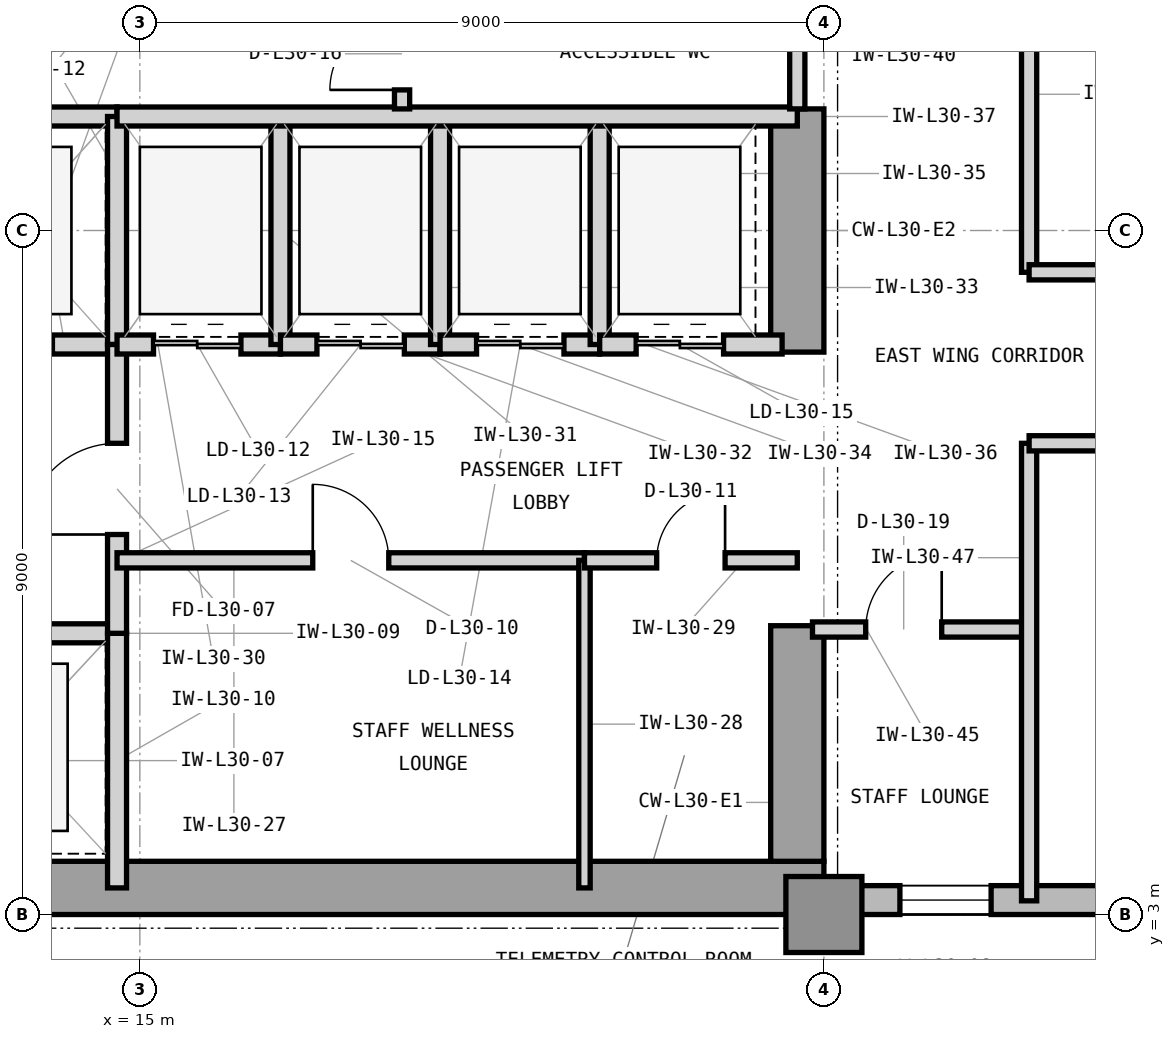
"""IFC4 building model, lengths in metres.
Left out: names, types, materials, properties, quantities, classifications, styles, units other than length and angle.
Written with IfcOpenShell. Run it as: python <this file> out.ifc"""

import sys

from ifc_helpers import new_model, si_unit, direction, frame, frame_2d, origin, origin_2d, place, context, subcontext, project, spatial, rectangle, extrude, element, fill, save


model = new_model("IFC4")
c1 = context("Model", 3, precision=1e-05, world=origin(), true_north=direction((0.0, 1.0)))
c2 = subcontext(c1, "Body", "Model", "MODEL_VIEW")
j1 = project(units=[si_unit("LENGTHUNIT", "METRE"), si_unit("PLANEANGLEUNIT", "RADIAN")], contexts=[c1])
p1 = place(None, origin())
s1 = spatial("IfcSite", under=j1, at=p1, CompositionType="ELEMENT")
p2 = place(p1, origin())
s2 = spatial("IfcBuilding", under=s1, at=p2, CompositionType="ELEMENT")
p3 = place(p2, frame((0.0, 0.0, 128.4)))
s3 = spatial("IfcBuildingStorey", under=s2, at=p3, CompositionType="ELEMENT", Elevation=128.4)
p4 = place(p3, frame((7.475, 3.35, 0.0), z_axis=(0.0, 0.0, 1.0), x_axis=(1.0, 0.0, 0.0)))
e1 = element("IfcWall", 1, at=p4, inside=s3, PredefinedType="SHEAR", context=c2, shape_type="SweptSolid", body=[
    extrude(rectangle(XDim=16.525, YDim=0.7, at=frame_2d((8.262, 0.0))), origin(), (0.0, 0.0, 1.0), 3.9),
])
p5 = place(p3, frame((23.65, 3.7, 0.0), z_axis=(0.0, 0.0, 1.0), x_axis=(0.0, 1.0, 0.0)))
e2 = element("IfcWall", 2, at=p5, inside=s3, PredefinedType="SHEAR", context=c2, shape_type="SweptSolid", body=[
    extrude(rectangle(XDim=3.1, YDim=0.7, at=frame_2d((1.55, 0.0))), origin(), (0.0, 0.0, 1.0), 3.9),
])
p6 = place(p3, frame((23.65, 10.4, 0.0), z_axis=(0.0, 0.0, 1.0), x_axis=(0.0, 1.0, 0.0)))
e3 = element("IfcWall", 3, at=p6, inside=s3, PredefinedType="SHEAR", context=c2, shape_type="SweptSolid", body=[
    extrude(rectangle(XDim=3.2, YDim=0.7, at=frame_2d((1.6, 0.0))), origin(), (0.0, 0.0, 1.0), 3.9),
])
p7 = place(p3, frame((24.0, 3.0, 0.0), z_axis=(0.0, 0.0, 1.0), x_axis=(1.0, 0.0, 0.0)))
e4 = element("IfcColumn", 4, at=p7, inside=s3, PredefinedType="COLUMN", context=c2, shape_type="SweptSolid", body=[
    extrude(rectangle(XDim=1.0, YDim=1.0, at=origin_2d()), origin(), (0.0, 0.0, 1.0), 3.9),
])
p8 = place(p3, frame((23.9, 3.19, 0.0), z_axis=(0.0, 0.0, 1.0), x_axis=(1.0, 0.0, 0.0)))
e5 = element("IfcWall", 5, at=p8, inside=s3, PredefinedType="STANDARD", context=c2, shape_type="SweptSolid", body=[
    extrude(rectangle(XDim=17.65, YDim=0.38, at=frame_2d((8.825, 0.0))), origin(), (0.0, 0.0, 1.0), 3.7),
])
p9 = place(p8, frame((13.808, 0.0, 0.85)))
e6 = element("IfcOpeningElement", 6, at=p9, cuts=e5, PredefinedType="OPENING", context=c2, shape_type="SweptSolid", body=[
    extrude(rectangle(XDim=1.8, YDim=2.25, at=frame_2d((0.9, 1.125))), frame((0.0, 0.2, 0.0), z_axis=(0.0, -1.0, 0.0), x_axis=(1.0, 0.0, 0.0)), (0.0, 0.0, 1.0), 0.4),
])
p10 = place(p8, frame((1.1, 0.0, 0.85)))
e7 = element("IfcOpeningElement", 7, at=p10, cuts=e5, PredefinedType="OPENING", context=c2, shape_type="SweptSolid", body=[
    extrude(rectangle(XDim=1.2, YDim=2.25, at=frame_2d((0.6, 1.125))), frame((0.0, 0.2, 0.0), z_axis=(0.0, -1.0, 0.0), x_axis=(1.0, 0.0, 0.0)), (0.0, 0.0, 1.0), 0.4),
])
p11 = place(p3, frame((11.82, 6.7, 0.0), z_axis=(0.0, 0.0, 1.0), x_axis=(1.0, 0.0, 0.0)))
e8 = element("IfcWall", 8, at=p11, inside=s3, PredefinedType="PARTITIONING", context=c2, shape_type="SweptSolid", body=[
    extrude(rectangle(XDim=2.88, YDim=0.25, at=frame_2d((1.44, 0.0))), origin(), (0.0, 0.0, 1.0), 3.233),
])
p12 = place(p11, frame((0.85, 0.0, 0.0)))
e9 = element("IfcOpeningElement", 9, at=p12, cuts=e8, PredefinedType="OPENING", context=c2, shape_type="SweptSolid", body=[
    extrude(rectangle(XDim=1.1, YDim=2.25, at=frame_2d((0.55, 1.125))), frame((0.0, 0.135, 0.0), z_axis=(0.0, -1.0, 0.0), x_axis=(1.0, 0.0, 0.0)), (0.0, 0.0, 1.0), 0.27),
])
p13 = place(p3, frame((14.7, 3.35, 0.0), z_axis=(0.0, 0.0, 1.0), x_axis=(0.0, 1.0, 0.0)))
e10 = element("IfcWall", 10, at=p13, inside=s3, PredefinedType="PARTITIONING", context=c2, shape_type="SweptSolid", body=[
    extrude(rectangle(XDim=3.35, YDim=0.25, at=frame_2d((1.675, 0.0))), origin(), (0.0, 0.0, 1.0), 3.69),
])
p14 = place(p3, frame((11.95, 10.5, 0.0), z_axis=(0.0, 0.0, 1.0), x_axis=(1.0, 0.0, 0.0)))
e11 = element("IfcWall", 11, at=p14, inside=s3, PredefinedType="PARTITIONING", context=c2, shape_type="SweptSolid", body=[
    extrude(rectangle(XDim=2.75, YDim=0.25, at=frame_2d((1.375, 0.0))), origin(), (0.0, 0.0, 1.0), 3.233),
])
p15 = place(p14, frame((0.8, 0.0, 0.0)))
e12 = element("IfcOpeningElement", 12, at=p15, cuts=e11, PredefinedType="OPENING", context=c2, shape_type="SweptSolid", body=[
    extrude(rectangle(XDim=1.1, YDim=2.25, at=frame_2d((0.55, 1.125))), frame((0.0, 0.135, 0.0), z_axis=(0.0, -1.0, 0.0), x_axis=(1.0, 0.0, 0.0)), (0.0, 0.0, 1.0), 0.27),
])
p16 = place(p3, frame((11.95, 13.5, 0.0), z_axis=(0.0, 0.0, 1.0), x_axis=(1.0, 0.0, 0.0)))
e13 = element("IfcWall", 13, at=p16, inside=s3, PredefinedType="PARTITIONING", context=c2, shape_type="SweptSolid", body=[
    extrude(rectangle(XDim=2.75, YDim=0.25, at=frame_2d((1.375, 0.0))), origin(), (0.0, 0.0, 1.0), 3.233),
])
p17 = place(p3, frame((14.7, 10.5, 0.0), z_axis=(0.0, 0.0, 1.0), x_axis=(0.0, 1.0, 0.0)))
e14 = element("IfcWall", 14, at=p17, inside=s3, PredefinedType="PARTITIONING", context=c2, shape_type="SweptSolid", body=[
    extrude(rectangle(XDim=3.0, YDim=0.25, at=frame_2d((1.5, 0.0))), origin(), (0.0, 0.0, 1.0), 3.69),
])
p18 = place(p3, frame((14.7, 6.7, 0.0), z_axis=(0.0, 0.0, 1.0), x_axis=(0.0, 1.0, 0.0)))
e15 = element("IfcWall", 15, at=p18, inside=s3, PredefinedType="PARTITIONING", context=c2, shape_type="SweptSolid", body=[
    extrude(rectangle(XDim=3.8, YDim=0.25, at=frame_2d((1.9, 0.0))), origin(), (0.0, 0.0, 1.0), 3.69),
])
p19 = place(p18, frame((1.3, 0.0, 0.0)))
e16 = element("IfcOpeningElement", 16, at=p19, cuts=e15, PredefinedType="OPENING", context=c2, shape_type="SweptSolid", body=[
    extrude(rectangle(XDim=1.2, YDim=2.2, at=frame_2d((0.6, 1.1))), frame((0.0, 0.135, 0.0), z_axis=(0.0, -1.0, 0.0), x_axis=(1.0, 0.0, 0.0)), (0.0, 0.0, 1.0), 0.27),
])
p20 = place(p3, frame((14.7, 7.66, 0.0), z_axis=(0.0, 0.0, 1.0), x_axis=(1.0, 0.0, 0.0)))
e17 = element("IfcWall", 17, at=p20, inside=s3, PredefinedType="PARTITIONING", context=c2, shape_type="SweptSolid", body=[
    extrude(rectangle(XDim=6.15, YDim=0.2, at=frame_2d((3.075, 0.0))), origin(), (0.0, 0.0, 1.0), 3.69),
])
p21 = place(p20, frame((2.575, 0.0, 0.0)))
e18 = element("IfcOpeningElement", 18, at=p21, cuts=e17, PredefinedType="OPENING", context=c2, shape_type="SweptSolid", body=[
    extrude(rectangle(XDim=1.0, YDim=2.15, at=frame_2d((0.5, 1.075))), frame((0.0, 0.11, 0.0), z_axis=(0.0, -1.0, 0.0), x_axis=(1.0, 0.0, 0.0)), (0.0, 0.0, 1.0), 0.22),
])
p22 = place(p3, frame((20.85, 3.35, 0.0), z_axis=(0.0, 0.0, 1.0), x_axis=(0.0, 1.0, 0.0)))
e19 = element("IfcWall", 19, at=p22, inside=s3, PredefinedType="PARTITIONING", context=c2, shape_type="SweptSolid", body=[
    extrude(rectangle(XDim=4.31, YDim=0.15, at=frame_2d((2.155, 0.0))), origin(), (0.0, 0.0, 1.0), 3.69),
])
p23 = place(p3, frame((20.85, 7.66, 0.0), z_axis=(0.0, 0.0, 1.0), x_axis=(1.0, 0.0, 0.0)))
e20 = element("IfcWall", 20, at=p23, inside=s3, PredefinedType="PARTITIONING", context=c2, shape_type="SweptSolid", body=[
    extrude(rectangle(XDim=2.8, YDim=0.2, at=frame_2d((1.4, 0.0))), origin(), (0.0, 0.0, 1.0), 3.69),
])
p24 = place(p23, frame((0.95, 0.0, 0.0)))
e21 = element("IfcOpeningElement", 21, at=p24, cuts=e20, PredefinedType="OPENING", context=c2, shape_type="SweptSolid", body=[
    extrude(rectangle(XDim=0.9, YDim=2.1, at=frame_2d((0.45, 1.05))), frame((0.0, 0.11, 0.0), z_axis=(0.0, -1.0, 0.0), x_axis=(1.0, 0.0, 0.0)), (0.0, 0.0, 1.0), 0.22),
])
p25 = place(p3, frame((14.7, 10.5, 0.0), z_axis=(0.0, 0.0, 1.0), x_axis=(1.0, 0.0, 0.0)))
e22 = element("IfcWall", 22, at=p25, inside=s3, PredefinedType="PARTITIONING", context=c2, shape_type="SweptSolid", body=[
    extrude(rectangle(XDim=2.15, YDim=0.25, at=frame_2d((1.075, 0.0))), origin(), (0.0, 0.0, 1.0), 3.233),
])
p26 = place(p25, frame((0.48, 0.0, 0.0)))
e23 = element("IfcOpeningElement", 23, at=p26, cuts=e22, PredefinedType="OPENING", context=c2, shape_type="SweptSolid", body=[
    extrude(rectangle(XDim=1.15, YDim=2.25, at=frame_2d((0.575, 1.125))), frame((0.0, 0.135, 0.0), z_axis=(0.0, -1.0, 0.0), x_axis=(1.0, 0.0, 0.0)), (0.0, 0.0, 1.0), 0.27),
])
p27 = place(p3, frame((16.85, 10.5, 0.0), z_axis=(0.0, 0.0, 1.0), x_axis=(0.0, 1.0, 0.0)))
e24 = element("IfcWall", 24, at=p27, inside=s3, PredefinedType="PARTITIONING", context=c2, shape_type="SweptSolid", body=[
    extrude(rectangle(XDim=3.0, YDim=0.25, at=frame_2d((1.5, 0.0))), origin(), (0.0, 0.0, 1.0), 3.69),
])
p28 = place(p3, frame((16.85, 10.5, 0.0), z_axis=(0.0, 0.0, 1.0), x_axis=(1.0, 0.0, 0.0)))
e25 = element("IfcWall", 25, at=p28, inside=s3, PredefinedType="PARTITIONING", context=c2, shape_type="SweptSolid", body=[
    extrude(rectangle(XDim=2.1, YDim=0.25, at=frame_2d((1.05, 0.0))), origin(), (0.0, 0.0, 1.0), 3.233),
])
p29 = place(p28, frame((0.48, 0.0, 0.0)))
e26 = element("IfcOpeningElement", 26, at=p29, cuts=e25, PredefinedType="OPENING", context=c2, shape_type="SweptSolid", body=[
    extrude(rectangle(XDim=1.15, YDim=2.25, at=frame_2d((0.575, 1.125))), frame((0.0, 0.135, 0.0), z_axis=(0.0, -1.0, 0.0), x_axis=(1.0, 0.0, 0.0)), (0.0, 0.0, 1.0), 0.27),
])
p30 = place(p3, frame((18.95, 10.5, 0.0), z_axis=(0.0, 0.0, 1.0), x_axis=(0.0, 1.0, 0.0)))
e27 = element("IfcWall", 27, at=p30, inside=s3, PredefinedType="PARTITIONING", context=c2, shape_type="SweptSolid", body=[
    extrude(rectangle(XDim=3.0, YDim=0.25, at=frame_2d((1.5, 0.0))), origin(), (0.0, 0.0, 1.0), 3.69),
])
p31 = place(p3, frame((18.95, 10.5, 0.0), z_axis=(0.0, 0.0, 1.0), x_axis=(1.0, 0.0, 0.0)))
e28 = element("IfcWall", 28, at=p31, inside=s3, PredefinedType="PARTITIONING", context=c2, shape_type="SweptSolid", body=[
    extrude(rectangle(XDim=2.1, YDim=0.25, at=frame_2d((1.05, 0.0))), origin(), (0.0, 0.0, 1.0), 3.233),
])
p32 = place(p31, frame((0.48, 0.0, 0.0)))
e29 = element("IfcOpeningElement", 29, at=p32, cuts=e28, PredefinedType="OPENING", context=c2, shape_type="SweptSolid", body=[
    extrude(rectangle(XDim=1.15, YDim=2.25, at=frame_2d((0.575, 1.125))), frame((0.0, 0.135, 0.0), z_axis=(0.0, -1.0, 0.0), x_axis=(1.0, 0.0, 0.0)), (0.0, 0.0, 1.0), 0.27),
])
p33 = place(p3, frame((21.05, 10.5, 0.0), z_axis=(0.0, 0.0, 1.0), x_axis=(0.0, 1.0, 0.0)))
e30 = element("IfcWall", 30, at=p33, inside=s3, PredefinedType="PARTITIONING", context=c2, shape_type="SweptSolid", body=[
    extrude(rectangle(XDim=3.0, YDim=0.25, at=frame_2d((1.5, 0.0))), origin(), (0.0, 0.0, 1.0), 3.69),
])
p34 = place(p3, frame((21.05, 10.5, 0.0), z_axis=(0.0, 0.0, 1.0), x_axis=(1.0, 0.0, 0.0)))
e31 = element("IfcWall", 31, at=p34, inside=s3, PredefinedType="PARTITIONING", context=c2, shape_type="SweptSolid", body=[
    extrude(rectangle(XDim=2.4, YDim=0.25, at=frame_2d((1.2, 0.0))), origin(), (0.0, 0.0, 1.0), 3.233),
])
p35 = place(p34, frame((0.48, 0.0, 0.0)))
e32 = element("IfcOpeningElement", 32, at=p35, cuts=e31, PredefinedType="OPENING", context=c2, shape_type="SweptSolid", body=[
    extrude(rectangle(XDim=1.15, YDim=2.25, at=frame_2d((0.575, 1.125))), frame((0.0, 0.135, 0.0), z_axis=(0.0, -1.0, 0.0), x_axis=(1.0, 0.0, 0.0)), (0.0, 0.0, 1.0), 0.27),
])
p36 = place(p3, frame((14.7, 13.5, 0.0), z_axis=(0.0, 0.0, 1.0), x_axis=(1.0, 0.0, 0.0)))
e33 = element("IfcWall", 33, at=p36, inside=s3, PredefinedType="PARTITIONING", context=c2, shape_type="SweptSolid", body=[
    extrude(rectangle(XDim=8.95, YDim=0.25, at=frame_2d((4.475, 0.0))), origin(), (0.0, 0.0, 1.0), 3.233),
])
p37 = place(p3, frame((18.45, 13.6, 0.0), z_axis=(0.0, 0.0, 1.0), x_axis=(0.0, 1.0, 0.0)))
e34 = element("IfcWall", 34, at=p37, inside=s3, PredefinedType="PARTITIONING", context=c2, shape_type="SweptSolid", body=[
    extrude(rectangle(XDim=3.0, YDim=0.2, at=frame_2d((1.5, 0.0))), origin(), (0.0, 0.0, 1.0), 3.69),
])
p38 = place(p37, frame((0.25, 0.0, 0.0)))
e35 = element("IfcOpeningElement", 35, at=p38, cuts=e34, PredefinedType="OPENING", context=c2, shape_type="SweptSolid", body=[
    extrude(rectangle(XDim=0.95, YDim=2.1, at=frame_2d((0.475, 1.05))), frame((0.0, 0.11, 0.0), z_axis=(0.0, -1.0, 0.0), x_axis=(1.0, 0.0, 0.0)), (0.0, 0.0, 1.0), 0.22),
])
p39 = place(p37, frame((1.8, 0.0, 0.0)))
e36 = element("IfcOpeningElement", 36, at=p39, cuts=e34, PredefinedType="OPENING", context=c2, shape_type="SweptSolid", body=[
    extrude(rectangle(XDim=0.95, YDim=2.1, at=frame_2d((0.475, 1.05))), frame((0.0, 0.11, 0.0), z_axis=(0.0, -1.0, 0.0), x_axis=(1.0, 0.0, 0.0)), (0.0, 0.0, 1.0), 0.22),
])
p40 = place(p3, frame((23.65, 13.6, 0.0), z_axis=(0.0, 0.0, 1.0), x_axis=(0.0, 1.0, 0.0)))
e37 = element("IfcWall", 37, at=p40, inside=s3, PredefinedType="PARTITIONING", context=c2, shape_type="SweptSolid", body=[
    extrude(rectangle(XDim=3.0, YDim=0.2, at=frame_2d((1.5, 0.0))), origin(), (0.0, 0.0, 1.0), 3.69),
])
p41 = place(p3, frame((23.85, 6.75, 0.0), z_axis=(0.0, 0.0, 1.0), x_axis=(1.0, 0.0, 0.0)))
e38 = element("IfcWall", 38, at=p41, inside=s3, PredefinedType="PARTITIONING", context=c2, shape_type="SweptSolid", body=[
    extrude(rectangle(XDim=2.85, YDim=0.2, at=frame_2d((1.425, 0.0))), origin(), (0.0, 0.0, 1.0), 3.69),
])
p42 = place(p41, frame((0.7, 0.0, 0.0)))
e39 = element("IfcOpeningElement", 39, at=p42, cuts=e38, PredefinedType="OPENING", context=c2, shape_type="SweptSolid", body=[
    extrude(rectangle(XDim=1.0, YDim=2.15, at=frame_2d((0.5, 1.075))), frame((0.0, 0.11, 0.0), z_axis=(0.0, -1.0, 0.0), x_axis=(1.0, 0.0, 0.0)), (0.0, 0.0, 1.0), 0.22),
])
p43 = place(p3, frame((26.7, 3.18, 0.0), z_axis=(0.0, 0.0, 1.0), x_axis=(0.0, 1.0, 0.0)))
e40 = element("IfcWall", 40, at=p43, inside=s3, PredefinedType="PARTITIONING", context=c2, shape_type="SweptSolid", body=[
    extrude(rectangle(XDim=6.02, YDim=0.2, at=frame_2d((3.01, 0.0))), origin(), (0.0, 0.0, 1.0), 3.69),
])
p44 = place(p3, frame((26.7, 11.45, 0.0), z_axis=(0.0, 0.0, 1.0), x_axis=(0.0, 1.0, 0.0)))
e41 = element("IfcWall", 41, at=p44, inside=s3, PredefinedType="PARTITIONING", context=c2, shape_type="SweptSolid", body=[
    extrude(rectangle(XDim=9.37, YDim=0.2, at=frame_2d((4.685, 0.0))), origin(), (0.0, 0.0, 1.0), 3.69),
])
p45 = place(p3, frame((26.7, 9.2, 0.0), z_axis=(0.0, 0.0, 1.0), x_axis=(1.0, 0.0, 0.0)))
e42 = element("IfcWall", 42, at=p45, inside=s3, PredefinedType="PARTITIONING", context=c2, shape_type="SweptSolid", body=[
    extrude(rectangle(XDim=13.5, YDim=0.2, at=frame_2d((6.75, 0.0))), origin(), (0.0, 0.0, 1.0), 3.69),
])
p46 = place(p45, frame((6.25, 0.0, 0.0)))
e43 = element("IfcOpeningElement", 43, at=p46, cuts=e42, PredefinedType="OPENING", context=c2, shape_type="SweptSolid", body=[
    extrude(rectangle(XDim=1.0, YDim=2.15, at=frame_2d((0.5, 1.075))), frame((0.0, 0.11, 0.0), z_axis=(0.0, -1.0, 0.0), x_axis=(1.0, 0.0, 0.0)), (0.0, 0.0, 1.0), 0.22),
])
p47 = place(p3, frame((26.7, 11.45, 0.0), z_axis=(0.0, 0.0, 1.0), x_axis=(1.0, 0.0, 0.0)))
e44 = element("IfcWall", 44, at=p47, inside=s3, PredefinedType="PARTITIONING", context=c2, shape_type="SweptSolid", body=[
    extrude(rectangle(XDim=7.5, YDim=0.2, at=frame_2d((3.75, 0.0))), origin(), (0.0, 0.0, 1.0), 3.69),
])
p48 = place(p47, frame((3.25, 0.0, 0.0)))
e45 = element("IfcOpeningElement", 45, at=p48, cuts=e44, PredefinedType="OPENING", context=c2, shape_type="SweptSolid", body=[
    extrude(rectangle(XDim=1.0, YDim=2.15, at=frame_2d((0.5, 1.075))), frame((0.0, 0.11, 0.0), z_axis=(0.0, -1.0, 0.0), x_axis=(1.0, 0.0, 0.0)), (0.0, 0.0, 1.0), 0.22),
])
p49 = place(p19, origin())
e46 = element("IfcDoor", 46, at=p49, inside=s3, OperationType="SINGLE_SWING_LEFT", PredefinedType="DOOR", context=c2, shape_type="SweptSolid", body=[
    extrude(rectangle(XDim=1.2, YDim=2.2, at=frame_2d((0.6, 1.1))), frame((0.0, 0.025, 0.0), z_axis=(0.0, -1.0, 0.0), x_axis=(1.0, 0.0, 0.0)), (0.0, 0.0, 1.0), 0.05),
])
fill(e16, e46)
p50 = place(p21, origin())
e47 = element("IfcDoor", 47, at=p50, inside=s3, OperationType="SINGLE_SWING_LEFT", PredefinedType="DOOR", context=c2, shape_type="SweptSolid", body=[
    extrude(rectangle(XDim=1.0, YDim=2.15, at=frame_2d((0.5, 1.075))), frame((0.0, 0.025, 0.0), z_axis=(0.0, -1.0, 0.0), x_axis=(1.0, 0.0, 0.0)), (0.0, 0.0, 1.0), 0.05),
])
fill(e18, e47)
p51 = place(p24, origin())
e48 = element("IfcDoor", 48, at=p51, inside=s3, OperationType="SINGLE_SWING_RIGHT", PredefinedType="TRAPDOOR", context=c2, shape_type="SweptSolid", body=[
    extrude(rectangle(XDim=0.9, YDim=2.1, at=frame_2d((0.45, 1.05))), frame((0.0, 0.025, 0.0), z_axis=(0.0, -1.0, 0.0), x_axis=(1.0, 0.0, 0.0)), (0.0, 0.0, 1.0), 0.05),
])
fill(e21, e48)
p52 = place(p26, origin())
e49 = element("IfcDoor", 49, at=p52, inside=s3, OperationType="DOUBLE_DOOR_SLIDING", PredefinedType="DOOR", context=c2, shape_type="SweptSolid", body=[
    extrude(rectangle(XDim=1.15, YDim=2.25, at=frame_2d((0.575, 1.125))), frame((0.0, 0.025, 0.0), z_axis=(0.0, -1.0, 0.0), x_axis=(1.0, 0.0, 0.0)), (0.0, 0.0, 1.0), 0.05),
])
fill(e23, e49)
p53 = place(p29, origin())
e50 = element("IfcDoor", 50, at=p53, inside=s3, OperationType="DOUBLE_DOOR_SLIDING", PredefinedType="DOOR", context=c2, shape_type="SweptSolid", body=[
    extrude(rectangle(XDim=1.15, YDim=2.25, at=frame_2d((0.575, 1.125))), frame((0.0, 0.025, 0.0), z_axis=(0.0, -1.0, 0.0), x_axis=(1.0, 0.0, 0.0)), (0.0, 0.0, 1.0), 0.05),
])
fill(e26, e50)
p54 = place(p32, origin())
e51 = element("IfcDoor", 51, at=p54, inside=s3, OperationType="DOUBLE_DOOR_SLIDING", PredefinedType="DOOR", context=c2, shape_type="SweptSolid", body=[
    extrude(rectangle(XDim=1.15, YDim=2.25, at=frame_2d((0.575, 1.125))), frame((0.0, 0.025, 0.0), z_axis=(0.0, -1.0, 0.0), x_axis=(1.0, 0.0, 0.0)), (0.0, 0.0, 1.0), 0.05),
])
fill(e29, e51)
p55 = place(p35, origin())
e52 = element("IfcDoor", 52, at=p55, inside=s3, OperationType="DOUBLE_DOOR_SLIDING", PredefinedType="DOOR", context=c2, shape_type="SweptSolid", body=[
    extrude(rectangle(XDim=1.15, YDim=2.25, at=frame_2d((0.575, 1.125))), frame((0.0, 0.025, 0.0), z_axis=(0.0, -1.0, 0.0), x_axis=(1.0, 0.0, 0.0)), (0.0, 0.0, 1.0), 0.05),
])
fill(e32, e52)
p56 = place(p38, origin())
e53 = element("IfcDoor", 53, at=p56, inside=s3, OperationType="SINGLE_SWING_LEFT", PredefinedType="DOOR", context=c2, shape_type="SweptSolid", body=[
    extrude(rectangle(XDim=0.95, YDim=2.1, at=frame_2d((0.475, 1.05))), frame((0.0, 0.025, 0.0), z_axis=(0.0, -1.0, 0.0), x_axis=(1.0, 0.0, 0.0)), (0.0, 0.0, 1.0), 0.05),
])
fill(e35, e53)
p57 = place(p42, origin())
e54 = element("IfcDoor", 54, at=p57, inside=s3, OperationType="SINGLE_SWING_RIGHT", PredefinedType="DOOR", context=c2, shape_type="SweptSolid", body=[
    extrude(rectangle(XDim=1.0, YDim=2.15, at=frame_2d((0.5, 1.075))), frame((0.0, 0.025, 0.0), z_axis=(0.0, -1.0, 0.0), x_axis=(1.0, 0.0, 0.0)), (0.0, 0.0, 1.0), 0.05),
])
fill(e39, e54)
p58 = place(p10, origin())
e55 = element("IfcWindow", 55, at=p58, inside=s3, PartitioningType="SINGLE_PANEL", PredefinedType="WINDOW", context=c2, shape_type="SweptSolid", body=[
    extrude(rectangle(XDim=1.2, YDim=2.25, at=frame_2d((0.6, 1.125))), frame((0.0, 0.11, 0.0), z_axis=(0.0, -1.0, 0.0), x_axis=(1.0, 0.0, 0.0)), (0.0, 0.0, 1.0), 0.06),
])
fill(e7, e55)
save(model, sys.argv[1])
